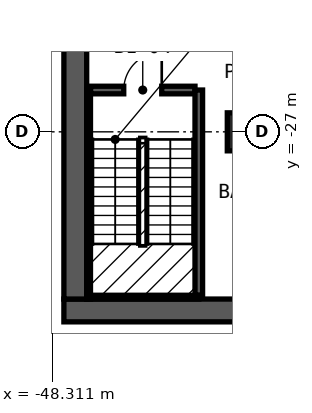
"""IFC4 building model, lengths in metres.
Left out: names, types, materials, properties, quantities, classifications, styles, units other than length and angle.
Written with IfcOpenShell. Run it as: python <this file> out.ifc"""

import sys

from ifc_helpers import new_model, si_unit, direction, frame, frame_2d, origin, origin_2d, place, context, subcontext, project, spatial, rectangle, extrude, element, fill, save


model = new_model("IFC4")
c1 = context("Model", 3, precision=1e-05, world=origin(), true_north=direction((0.0, 1.0)))
c2 = subcontext(c1, "Body", "Model", "MODEL_VIEW")
j1 = project(units=[si_unit("LENGTHUNIT", "METRE"), si_unit("PLANEANGLEUNIT", "RADIAN")], contexts=[c1])
p1 = place(None, origin())
s1 = spatial("IfcSite", under=j1, at=p1, CompositionType="ELEMENT")
p2 = place(p1, origin())
s2 = spatial("IfcBuilding", under=s1, at=p2, CompositionType="ELEMENT")
p3 = place(p2, frame((0.0, 0.0, -4.2)))
s3 = spatial("IfcBuildingStorey", under=s2, at=p3, CompositionType="ELEMENT", Elevation=-4.2)
p4 = place(p3, frame((-48.0, -31.7, 0.0), z_axis=(0.0, 0.0, 1.0), x_axis=(1.0, 0.0, 0.0)))
e1 = element("IfcWall", 1, at=p4, inside=s3, PredefinedType="SOLIDWALL", context=c2, shape_type="SweptSolid", body=[
    extrude(rectangle(XDim=96.0, YDim=0.6, at=frame_2d((48.0, 0.0))), origin(), (0.0, 0.0, 1.0), 4.2),
])
p5 = place(p3, frame((-47.7, -31.4, 0.0), z_axis=(0.0, 0.0, 1.0), x_axis=(0.0, 1.0, 0.0)))
e2 = element("IfcWall", 2, at=p5, inside=s3, PredefinedType="SOLIDWALL", context=c2, shape_type="SweptSolid", body=[
    extrude(rectangle(XDim=70.8, YDim=0.6, at=frame_2d((35.4, 0.0))), origin(), (0.0, 0.0, 1.0), 4.2),
])
p6 = place(p3, frame((-43.2, -27.0, 0.0), z_axis=(0.0, 0.0, 1.0), x_axis=(1.0, 0.0, 0.0)))
e3 = element("IfcColumn", 3, at=p6, inside=s3, PredefinedType="COLUMN", context=c2, shape_type="SweptSolid", body=[
    extrude(rectangle(XDim=1.0, YDim=1.0, at=origin_2d()), origin(), (0.0, 0.0, 1.0), 4.2),
])
p7 = place(p3, frame((-47.3, -25.9, 0.0), z_axis=(0.0, 0.0, 1.0), x_axis=(1.0, 0.0, 0.0)))
e4 = element("IfcWall", 4, at=p7, inside=s3, PredefinedType="SOLIDWALL", context=c2, shape_type="SweptSolid", body=[
    extrude(rectangle(XDim=2.75, YDim=0.2, at=frame_2d((1.375, 0.0))), origin(), (0.0, 0.0, 1.0), 3.75),
])
p8 = place(p7, frame((1.875, 0.0, 0.0), z_axis=(0.0, 0.0, 1.0), x_axis=(-1.0, 0.0, 0.0)))
e5 = element("IfcOpeningElement", 5, at=p8, cuts=e4, PredefinedType="OPENING", context=c2, shape_type="SweptSolid", body=[
    extrude(rectangle(XDim=1.0, YDim=2.1, at=frame_2d((0.5, 1.05))), frame((0.0, 0.11, 0.0), z_axis=(0.0, -1.0, 0.0), x_axis=(1.0, 0.0, 0.0)), (0.0, 0.0, 1.0), 0.22),
])
p9 = place(p3, frame((-44.45, -31.3, 0.0), z_axis=(0.0, 0.0, 1.0), x_axis=(0.0, 1.0, 0.0)))
e6 = element("IfcWall", 6, at=p9, inside=s3, PredefinedType="SOLIDWALL", context=c2, shape_type="SweptSolid", body=[
    extrude(rectangle(XDim=5.4, YDim=0.2, at=frame_2d((2.7, 0.0))), origin(), (0.0, 0.0, 1.0), 3.75),
])
p10 = place(p3, frame((-47.35, -31.4, 0.0), z_axis=(0.0, 0.0, 1.0), x_axis=(0.0, 1.0, 0.0)))
e7 = element("IfcWall", 7, at=p10, inside=s3, PredefinedType="SOLIDWALL", context=c2, shape_type="SweptSolid", body=[
    extrude(rectangle(XDim=5.5, YDim=0.1, at=frame_2d((2.75, 0.0))), origin(), (0.0, 0.0, 1.0), 3.75),
])
p11 = place(p3, frame((-47.4, -31.35, 0.0), z_axis=(0.0, 0.0, 1.0), x_axis=(1.0, 0.0, 0.0)))
e8 = element("IfcWall", 8, at=p11, inside=s3, PredefinedType="SOLIDWALL", context=c2, shape_type="SweptSolid", body=[
    extrude(rectangle(XDim=2.95, YDim=0.1, at=frame_2d((1.475, 0.0))), origin(), (0.0, 0.0, 1.0), 3.75),
])
p12 = place(p8, origin())
e9 = element("IfcDoor", 9, at=p12, inside=s3, OperationType="SINGLE_SWING_LEFT", PredefinedType="DOOR", context=c2, shape_type="SweptSolid", body=[
    extrude(rectangle(XDim=1.0, YDim=2.1, at=frame_2d((0.5, 1.05))), frame((0.0, 0.025, 0.0), z_axis=(0.0, -1.0, 0.0), x_axis=(1.0, 0.0, 0.0)), (0.0, 0.0, 1.0), 0.05),
])
fill(e5, e9)
save(model, sys.argv[1])
